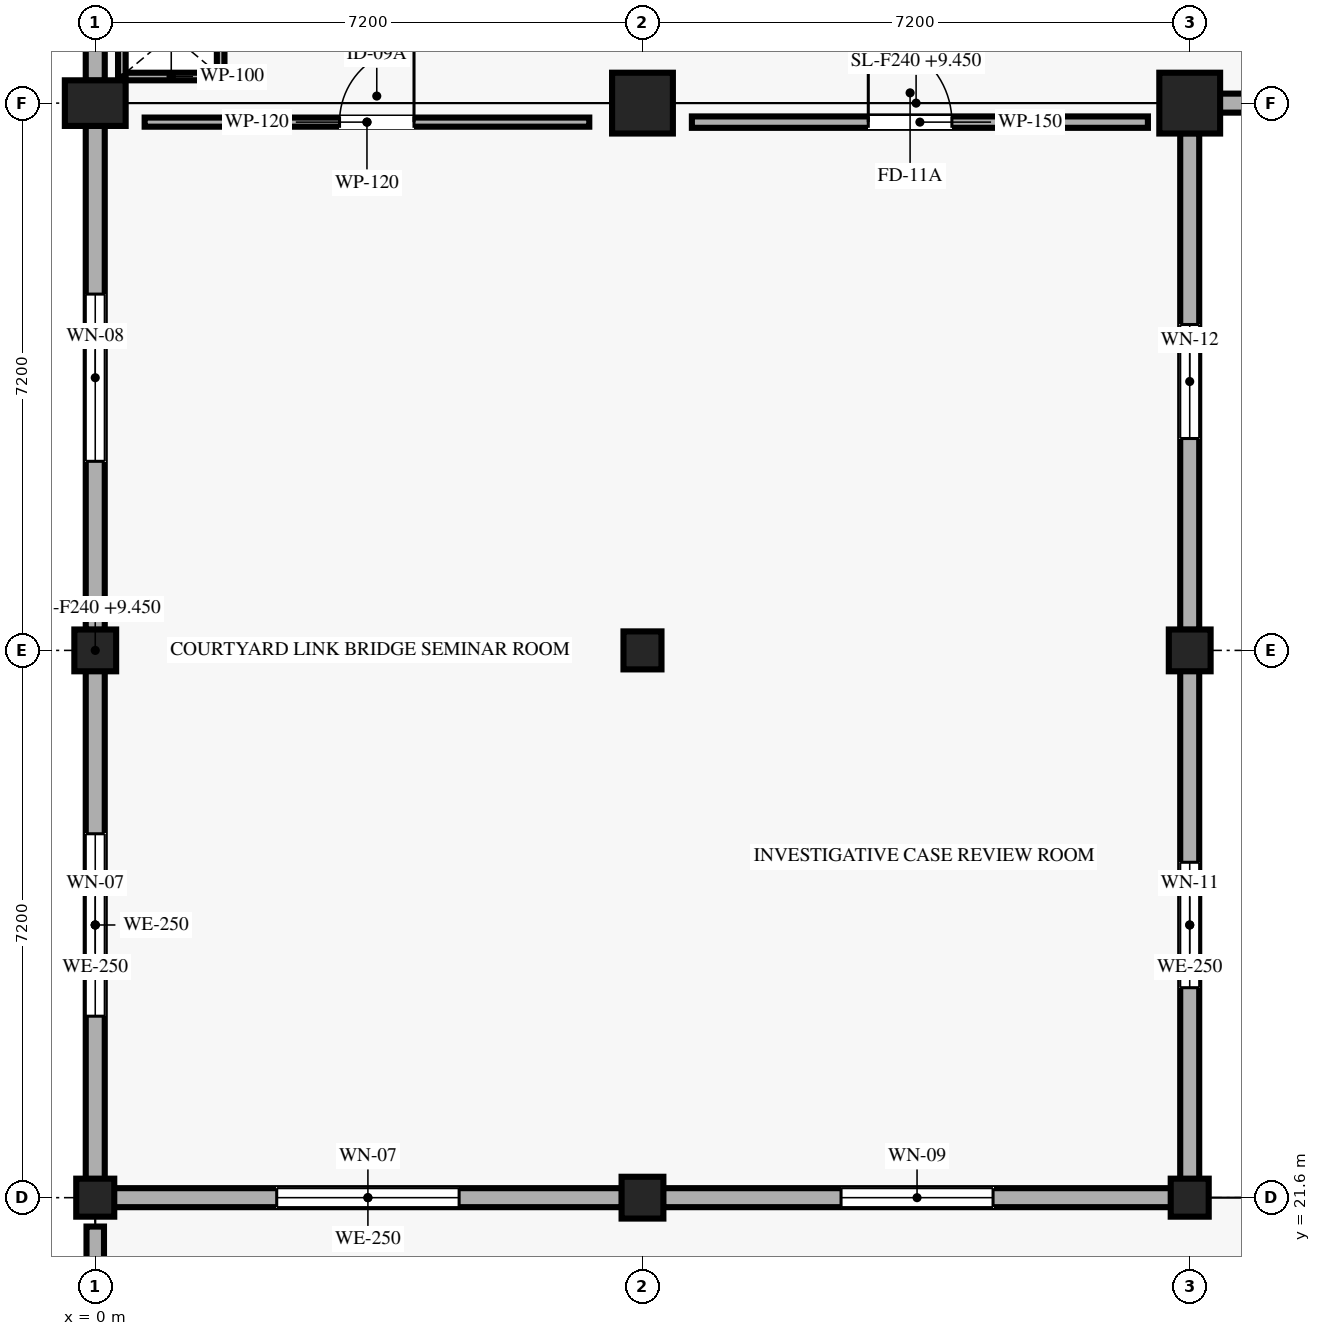
"""IFC4 building model, lengths in metres.
Left out: names, types, materials, properties, quantities, classifications, styles, units other than length and angle.
Written with IfcOpenShell. Run it as: python <this file> out.ifc"""

import sys

from ifc_helpers import new_model, si_unit, direction, frame, frame_2d, origin, origin_2d, place, context, subcontext, project, spatial, rectangle, extrude, element, fill, save


model = new_model("IFC4")
c1 = context("Model", 3, precision=1e-05, world=origin(), true_north=direction((0.0, 1.0)))
c2 = subcontext(c1, "Body", "Model", "MODEL_VIEW")
j1 = project(units=[si_unit("LENGTHUNIT", "METRE"), si_unit("PLANEANGLEUNIT", "RADIAN")], contexts=[c1])
p1 = place(None, origin())
s1 = spatial("IfcSite", under=j1, at=p1, CompositionType="ELEMENT")
p2 = place(p1, origin())
s2 = spatial("IfcBuilding", under=s1, at=p2, CompositionType="ELEMENT")
p3 = place(p2, frame((0.0, 0.0, 9.45)))
s3 = spatial("IfcBuildingStorey", under=s2, at=p3, CompositionType="ELEMENT", Elevation=9.45)
p4 = place(p3, frame((0.0, 21.6, 0.0), z_axis=(0.0, 0.0, 1.0), x_axis=(1.0, 0.0, 0.0)))
e1 = element("IfcColumn", 1, at=p4, inside=s3, PredefinedType="COLUMN", context=c2, shape_type="SweptSolid", body=[
    extrude(rectangle(XDim=0.5, YDim=0.5, at=origin_2d()), origin(), (0.0, 0.0, 1.0), 4.05),
])
p5 = place(p3, frame((0.0, 28.8, 0.0), z_axis=(0.0, 0.0, 1.0), x_axis=(1.0, 0.0, 0.0)))
e2 = element("IfcColumn", 2, at=p5, inside=s3, PredefinedType="COLUMN", context=c2, shape_type="SweptSolid", body=[
    extrude(rectangle(XDim=0.55, YDim=0.55, at=origin_2d()), origin(), (0.0, 0.0, 1.0), 4.05),
])
p6 = place(p3, frame((0.0, 36.0, 0.0), z_axis=(0.0, 0.0, 1.0), x_axis=(0.0, 1.0, 0.0)))
e3 = element("IfcColumn", 3, at=p6, inside=s3, PredefinedType="COLUMN", context=c2, shape_type="SweptSolid", body=[
    extrude(rectangle(XDim=0.6, YDim=0.8, at=origin_2d()), origin(), (0.0, 0.0, 1.0), 4.05),
])
p7 = place(p3, frame((7.2, 21.6, 0.0), z_axis=(0.0, 0.0, 1.0), x_axis=(1.0, 0.0, 0.0)))
e4 = element("IfcColumn", 4, at=p7, inside=s3, PredefinedType="COLUMN", context=c2, shape_type="SweptSolid", body=[
    extrude(rectangle(XDim=0.55, YDim=0.55, at=origin_2d()), origin(), (0.0, 0.0, 1.0), 4.05),
])
p8 = place(p3, frame((7.2, 28.8, 0.0), z_axis=(0.0, 0.0, 1.0), x_axis=(1.0, 0.0, 0.0)))
e5 = element("IfcColumn", 5, at=p8, inside=s3, PredefinedType="COLUMN", context=c2, shape_type="SweptSolid", body=[
    extrude(rectangle(XDim=0.5, YDim=0.5, at=origin_2d()), origin(), (0.0, 0.0, 1.0), 4.05),
])
p9 = place(p3, frame((7.2, 36.0, 0.0), z_axis=(0.0, 0.0, 1.0), x_axis=(1.0, 0.0, 0.0)))
e6 = element("IfcColumn", 6, at=p9, inside=s3, PredefinedType="COLUMN", context=c2, shape_type="SweptSolid", body=[
    extrude(rectangle(XDim=0.8, YDim=0.8, at=origin_2d()), origin(), (0.0, 0.0, 1.0), 4.05),
])
p10 = place(p3, frame((14.4, 21.6, 0.0), z_axis=(0.0, 0.0, 1.0), x_axis=(1.0, 0.0, 0.0)))
e7 = element("IfcColumn", 7, at=p10, inside=s3, PredefinedType="COLUMN", context=c2, shape_type="SweptSolid", body=[
    extrude(rectangle(XDim=0.5, YDim=0.5, at=origin_2d()), origin(), (0.0, 0.0, 1.0), 4.05),
])
p11 = place(p3, frame((14.4, 28.8, 0.0), z_axis=(0.0, 0.0, 1.0), x_axis=(1.0, 0.0, 0.0)))
e8 = element("IfcColumn", 8, at=p11, inside=s3, PredefinedType="COLUMN", context=c2, shape_type="SweptSolid", body=[
    extrude(rectangle(XDim=0.55, YDim=0.55, at=origin_2d()), origin(), (0.0, 0.0, 1.0), 4.05),
])
p12 = place(p3, frame((14.4, 36.0, 0.0), z_axis=(0.0, 0.0, 1.0), x_axis=(1.0, 0.0, 0.0)))
e9 = element("IfcColumn", 9, at=p12, inside=s3, PredefinedType="COLUMN", context=c2, shape_type="SweptSolid", body=[
    extrude(rectangle(XDim=0.8, YDim=0.8, at=origin_2d()), origin(), (0.0, 0.0, 1.0), 4.05),
])
p13 = place(p3, frame((0.245, 21.6, 0.0), z_axis=(0.0, 0.0, 1.0), x_axis=(1.0, 0.0, 0.0)))
e10 = element("IfcWall", 10, at=p13, inside=s3, PredefinedType="SOLIDWALL", context=c2, shape_type="SweptSolid", body=[
    extrude(rectangle(XDim=6.685, YDim=0.25, at=frame_2d((3.342, 0.0))), origin(), (0.0, 0.0, 1.0), 3.195),
])
p14 = place(p13, frame((2.143, 0.0, 0.85)))
e11 = element("IfcOpeningElement", 11, at=p14, cuts=e10, PredefinedType="OPENING", context=c2, shape_type="SweptSolid", body=[
    extrude(rectangle(XDim=2.4, YDim=1.75, at=frame_2d((1.2, 0.875))), frame((0.0, 0.135, 0.0), z_axis=(0.0, -1.0, 0.0), x_axis=(1.0, 0.0, 0.0)), (0.0, 0.0, 1.0), 0.27),
])
p15 = place(p3, frame((7.47, 21.6, 0.0), z_axis=(0.0, 0.0, 1.0), x_axis=(1.0, 0.0, 0.0)))
e12 = element("IfcWall", 12, at=p15, inside=s3, PredefinedType="SOLIDWALL", context=c2, shape_type="SweptSolid", body=[
    extrude(rectangle(XDim=6.685, YDim=0.25, at=frame_2d((3.343, 0.0))), origin(), (0.0, 0.0, 1.0), 3.195),
])
p16 = place(p15, frame((2.343, 0.0, 0.85)))
e13 = element("IfcOpeningElement", 13, at=p16, cuts=e12, PredefinedType="OPENING", context=c2, shape_type="SweptSolid", body=[
    extrude(rectangle(XDim=2.0, YDim=1.65, at=frame_2d((1.0, 0.825))), frame((0.0, 0.135, 0.0), z_axis=(0.0, -1.0, 0.0), x_axis=(1.0, 0.0, 0.0)), (0.0, 0.0, 1.0), 0.27),
])
p17 = place(p3, frame((14.795, 36.0, 0.0), z_axis=(0.0, 0.0, 1.0), x_axis=(1.0, 0.0, 0.0)))
e14 = element("IfcWall", 14, at=p17, inside=s3, PredefinedType="SOLIDWALL", context=c2, shape_type="SweptSolid", body=[
    extrude(rectangle(XDim=6.41, YDim=0.25, at=frame_2d((3.205, 0.0))), origin(), (0.0, 0.0, 1.0), 3.195),
])
p18 = place(p17, frame((2.505, 0.0, 0.85)))
e15 = element("IfcOpeningElement", 15, at=p18, cuts=e14, PredefinedType="OPENING", context=c2, shape_type="SweptSolid", body=[
    extrude(rectangle(XDim=1.4, YDim=1.6, at=frame_2d((0.7, 0.8))), frame((0.0, 0.135, 0.0), z_axis=(0.0, -1.0, 0.0), x_axis=(1.0, 0.0, 0.0)), (0.0, 0.0, 1.0), 0.27),
])
p19 = place(p3, frame((0.0, 21.845, 0.0), z_axis=(0.0, 0.0, 1.0), x_axis=(0.0, 1.0, 0.0)))
e16 = element("IfcWall", 16, at=p19, inside=s3, PredefinedType="SOLIDWALL", context=c2, shape_type="SweptSolid", body=[
    extrude(rectangle(XDim=6.685, YDim=0.25, at=frame_2d((3.343, 0.0))), origin(), (0.0, 0.0, 1.0), 3.195),
])
p20 = place(p19, frame((2.143, 0.0, 0.85)))
e17 = element("IfcOpeningElement", 17, at=p20, cuts=e16, PredefinedType="OPENING", context=c2, shape_type="SweptSolid", body=[
    extrude(rectangle(XDim=2.4, YDim=1.75, at=frame_2d((1.2, 0.875))), frame((0.0, 0.135, 0.0), z_axis=(0.0, -1.0, 0.0), x_axis=(1.0, 0.0, 0.0)), (0.0, 0.0, 1.0), 0.27),
])
p21 = place(p3, frame((0.0, 29.07, 0.0), z_axis=(0.0, 0.0, 1.0), x_axis=(0.0, 1.0, 0.0)))
e18 = element("IfcWall", 18, at=p21, inside=s3, PredefinedType="SOLIDWALL", context=c2, shape_type="SweptSolid", body=[
    extrude(rectangle(XDim=6.635, YDim=0.25, at=frame_2d((3.317, 0.0))), origin(), (0.0, 0.0, 1.0), 3.195),
])
p22 = place(p21, frame((2.218, 0.0, 0.85)))
e19 = element("IfcOpeningElement", 19, at=p22, cuts=e18, PredefinedType="OPENING", context=c2, shape_type="SweptSolid", body=[
    extrude(rectangle(XDim=2.2, YDim=1.7, at=frame_2d((1.1, 0.85))), frame((0.0, 0.135, 0.0), z_axis=(0.0, -1.0, 0.0), x_axis=(1.0, 0.0, 0.0)), (0.0, 0.0, 1.0), 0.27),
])
p23 = place(p3, frame((0.0, 36.295, 0.0), z_axis=(0.0, 0.0, 1.0), x_axis=(0.0, 1.0, 0.0)))
e20 = element("IfcWall", 20, at=p23, inside=s3, PredefinedType="SOLIDWALL", context=c2, shape_type="SweptSolid", body=[
    extrude(rectangle(XDim=3.11, YDim=0.25, at=frame_2d((1.555, 0.0))), origin(), (0.0, 0.0, 1.0), 3.195),
])
p24 = place(p23, frame((0.93, 0.0, 0.85)))
e21 = element("IfcOpeningElement", 21, at=p24, cuts=e20, PredefinedType="OPENING", context=c2, shape_type="SweptSolid", body=[
    extrude(rectangle(XDim=1.25, YDim=1.5, at=frame_2d((0.625, 0.75))), frame((0.0, 0.135, 0.0), z_axis=(0.0, -1.0, 0.0), x_axis=(1.0, 0.0, 0.0)), (0.0, 0.0, 1.0), 0.27),
])
p25 = place(p3, frame((14.4, 21.845, 0.0), z_axis=(0.0, 0.0, 1.0), x_axis=(0.0, 1.0, 0.0)))
e22 = element("IfcWall", 22, at=p25, inside=s3, PredefinedType="SOLIDWALL", context=c2, shape_type="SweptSolid", body=[
    extrude(rectangle(XDim=6.685, YDim=0.25, at=frame_2d((3.343, 0.0))), origin(), (0.0, 0.0, 1.0), 3.195),
])
p26 = place(p25, frame((2.518, 0.0, 0.85)))
e23 = element("IfcOpeningElement", 23, at=p26, cuts=e22, PredefinedType="OPENING", context=c2, shape_type="SweptSolid", body=[
    extrude(rectangle(XDim=1.65, YDim=1.55, at=frame_2d((0.825, 0.775))), frame((0.0, 0.135, 0.0), z_axis=(0.0, -1.0, 0.0), x_axis=(1.0, 0.0, 0.0)), (0.0, 0.0, 1.0), 0.27),
])
p27 = place(p3, frame((14.4, 29.07, 0.0), z_axis=(0.0, 0.0, 1.0), x_axis=(0.0, 1.0, 0.0)))
e24 = element("IfcWall", 24, at=p27, inside=s3, PredefinedType="SOLIDWALL", context=c2, shape_type="SweptSolid", body=[
    extrude(rectangle(XDim=6.535, YDim=0.25, at=frame_2d((3.268, 0.0))), origin(), (0.0, 0.0, 1.0), 3.195),
])
p28 = place(p27, frame((2.518, 0.0, 0.85)))
e25 = element("IfcOpeningElement", 25, at=p28, cuts=e24, PredefinedType="OPENING", context=c2, shape_type="SweptSolid", body=[
    extrude(rectangle(XDim=1.5, YDim=2.05, at=frame_2d((0.75, 1.025))), frame((0.0, 0.135, 0.0), z_axis=(0.0, -1.0, 0.0), x_axis=(1.0, 0.0, 0.0)), (0.0, 0.0, 1.0), 0.27),
])
p29 = place(p3, frame((0.0, 14.78, -0.24), z_axis=(0.0, 0.0, 1.0), x_axis=(0.0, 1.0, 0.0)))
e26 = element("IfcWall", 26, at=p29, inside=s3, PredefinedType="SOLIDWALL", context=c2, shape_type="SweptSolid", body=[
    extrude(rectangle(XDim=6.44, YDim=0.23, at=frame_2d((3.22, 0.0))), origin(), (0.0, 0.0, 1.0), 1.89),
])
p30 = place(p3, frame((0.35, 36.35, 0.0), z_axis=(0.0, 0.0, 1.0), x_axis=(1.0, 0.0, 0.0)))
e27 = element("IfcWall", 27, at=p30, inside=s3, PredefinedType="PARTITIONING", context=c2, shape_type="SweptSolid", body=[
    extrude(rectangle(XDim=1.3, YDim=0.1, at=frame_2d((0.65, 0.0))), origin(), (0.0, 0.0, 1.0), 3.2),
])
p31 = place(p3, frame((0.35, 36.35, 0.0), z_axis=(0.0, 0.0, 1.0), x_axis=(0.0, 1.0, 0.0)))
e28 = element("IfcWall", 28, at=p31, inside=s3, PredefinedType="PARTITIONING", context=c2, shape_type="SweptSolid", body=[
    extrude(rectangle(XDim=1.1, YDim=0.1, at=frame_2d((0.55, 0.0))), origin(), (0.0, 0.0, 1.0), 3.2),
])
p32 = place(p3, frame((1.65, 36.35, 0.0), z_axis=(0.0, 0.0, 1.0), x_axis=(0.0, 1.0, 0.0)))
e29 = element("IfcWall", 29, at=p32, inside=s3, PredefinedType="PARTITIONING", context=c2, shape_type="SweptSolid", body=[
    extrude(rectangle(XDim=1.1, YDim=0.1, at=frame_2d((0.55, 0.0))), origin(), (0.0, 0.0, 1.0), 3.81),
])
p33 = place(p3, frame((0.65, 35.75, 0.0), z_axis=(0.0, 0.0, 1.0), x_axis=(1.0, 0.0, 0.0)))
e30 = element("IfcWall", 30, at=p33, inside=s3, PredefinedType="PARTITIONING", context=c2, shape_type="SweptSolid", body=[
    extrude(rectangle(XDim=5.85, YDim=0.12, at=frame_2d((2.925, 0.0))), origin(), (0.0, 0.0, 1.0), 3.2),
])
p34 = place(p33, frame((2.564, 0.0, 0.0)))
e31 = element("IfcOpeningElement", 31, at=p34, cuts=e30, PredefinedType="OPENING", context=c2, shape_type="SweptSolid", body=[
    extrude(rectangle(XDim=0.98, YDim=2.1, at=frame_2d((0.49, 1.05))), frame((0.0, 0.07, 0.0), z_axis=(0.0, -1.0, 0.0), x_axis=(1.0, 0.0, 0.0)), (0.0, 0.0, 1.0), 0.14),
])
p35 = place(p3, frame((7.85, 35.75, 0.0), z_axis=(0.0, 0.0, 1.0), x_axis=(1.0, 0.0, 0.0)))
e32 = element("IfcWall", 32, at=p35, inside=s3, PredefinedType="PARTITIONING", context=c2, shape_type="SweptSolid", body=[
    extrude(rectangle(XDim=6.0, YDim=0.15, at=frame_2d((3.0, 0.0))), origin(), (0.0, 0.0, 1.0), 3.2),
])
p36 = place(p35, frame((2.321, 0.0, 0.0)))
e33 = element("IfcOpeningElement", 33, at=p36, cuts=e32, PredefinedType="OPENING", context=c2, shape_type="SweptSolid", body=[
    extrude(rectangle(XDim=1.1, YDim=2.2, at=frame_2d((0.55, 1.1))), frame((0.0, 0.085, 0.0), z_axis=(0.0, -1.0, 0.0), x_axis=(1.0, 0.0, 0.0)), (0.0, 0.0, 1.0), 0.17),
])
p37 = place(p14, origin())
e34 = element("IfcWindow", 34, at=p37, inside=s3, PartitioningType="SINGLE_PANEL", PredefinedType="WINDOW", context=c2, shape_type="SweptSolid", body=[
    extrude(rectangle(XDim=2.4, YDim=1.75, at=frame_2d((1.2, 0.875))), frame((0.0, 0.03, 0.0), z_axis=(0.0, -1.0, 0.0), x_axis=(1.0, 0.0, 0.0)), (0.0, 0.0, 1.0), 0.06),
])
fill(e11, e34)
p38 = place(p16, origin())
e35 = element("IfcWindow", 35, at=p38, inside=s3, PartitioningType="SINGLE_PANEL", PredefinedType="WINDOW", context=c2, shape_type="SweptSolid", body=[
    extrude(rectangle(XDim=2.0, YDim=1.65, at=frame_2d((1.0, 0.825))), frame((0.0, 0.03, 0.0), z_axis=(0.0, -1.0, 0.0), x_axis=(1.0, 0.0, 0.0)), (0.0, 0.0, 1.0), 0.06),
])
fill(e13, e35)
p39 = place(p20, origin())
e36 = element("IfcWindow", 36, at=p39, inside=s3, PartitioningType="SINGLE_PANEL", PredefinedType="WINDOW", context=c2, shape_type="SweptSolid", body=[
    extrude(rectangle(XDim=2.4, YDim=1.75, at=frame_2d((1.2, 0.875))), frame((0.0, 0.03, 0.0), z_axis=(0.0, -1.0, 0.0), x_axis=(1.0, 0.0, 0.0)), (0.0, 0.0, 1.0), 0.06),
])
fill(e17, e36)
p40 = place(p22, origin())
e37 = element("IfcWindow", 37, at=p40, inside=s3, PartitioningType="SINGLE_PANEL", PredefinedType="WINDOW", context=c2, shape_type="SweptSolid", body=[
    extrude(rectangle(XDim=2.2, YDim=1.7, at=frame_2d((1.1, 0.85))), frame((0.0, 0.03, 0.0), z_axis=(0.0, -1.0, 0.0), x_axis=(1.0, 0.0, 0.0)), (0.0, 0.0, 1.0), 0.06),
])
fill(e19, e37)
p41 = place(p26, origin())
e38 = element("IfcWindow", 38, at=p41, inside=s3, PartitioningType="SINGLE_PANEL", PredefinedType="WINDOW", context=c2, shape_type="SweptSolid", body=[
    extrude(rectangle(XDim=1.65, YDim=1.55, at=frame_2d((0.825, 0.775))), frame((0.0, 0.03, 0.0), z_axis=(0.0, -1.0, 0.0), x_axis=(1.0, 0.0, 0.0)), (0.0, 0.0, 1.0), 0.06),
])
fill(e23, e38)
p42 = place(p28, origin())
e39 = element("IfcWindow", 39, at=p42, inside=s3, PartitioningType="SINGLE_PANEL", PredefinedType="WINDOW", context=c2, shape_type="SweptSolid", body=[
    extrude(rectangle(XDim=1.5, YDim=2.05, at=frame_2d((0.75, 1.025))), frame((0.0, 0.03, 0.0), z_axis=(0.0, -1.0, 0.0), x_axis=(1.0, 0.0, 0.0)), (0.0, 0.0, 1.0), 0.06),
])
fill(e25, e39)
p43 = place(p34, origin())
e40 = element("IfcDoor", 40, at=p43, inside=s3, OperationType="SINGLE_SWING_RIGHT", PredefinedType="DOOR", context=c2, shape_type="SweptSolid", body=[
    extrude(rectangle(XDim=0.98, YDim=2.1, at=frame_2d((0.49, 1.05))), frame((0.0, 0.025, 0.0), z_axis=(0.0, -1.0, 0.0), x_axis=(1.0, 0.0, 0.0)), (0.0, 0.0, 1.0), 0.05),
])
fill(e31, e40)
p44 = place(p36, origin())
e41 = element("IfcDoor", 41, at=p44, inside=s3, OperationType="SINGLE_SWING_LEFT", PredefinedType="DOOR", context=c2, shape_type="SweptSolid", body=[
    extrude(rectangle(XDim=1.1, YDim=2.2, at=frame_2d((0.55, 1.1))), frame((0.0, 0.025, 0.0), z_axis=(0.0, -1.0, 0.0), x_axis=(1.0, 0.0, 0.0)), (0.0, 0.0, 1.0), 0.05),
])
fill(e33, e41)
save(model, sys.argv[1])
